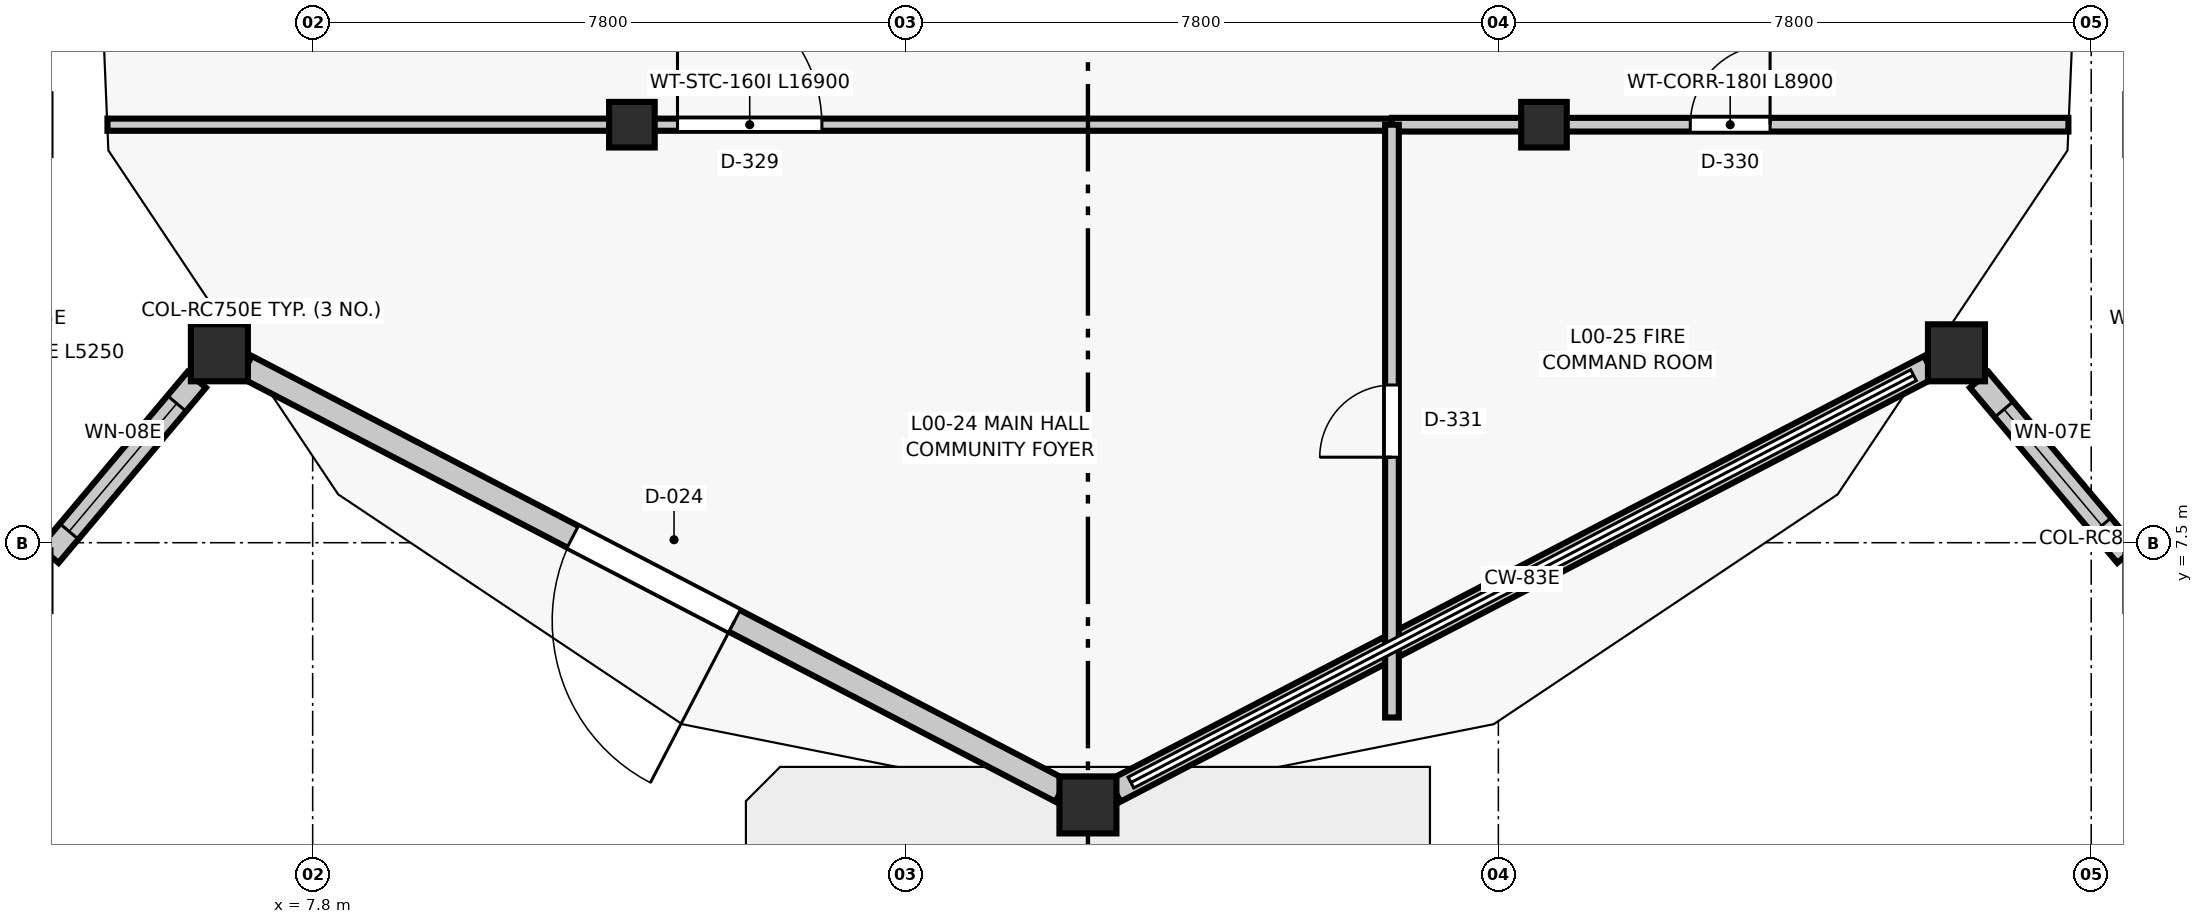
"""IFC4 building model, lengths in metres.
Left out: names, types, materials, properties, quantities, classifications, styles, units other than length and angle.
Written with IfcOpenShell. Run it as: python <this file> out.ifc"""

import sys

from ifc_helpers import new_model, si_unit, direction, frame, frame_2d, origin, origin_2d, place, context, subcontext, project, spatial, rectangle, extrude, element, fill, save


model = new_model("IFC4")
c1 = context("Model", 3, precision=1e-05, world=origin(), true_north=direction((0.0, 1.0)))
c2 = subcontext(c1, "Body", "Model", "MODEL_VIEW")
j1 = project(units=[si_unit("LENGTHUNIT", "METRE"), si_unit("PLANEANGLEUNIT", "RADIAN")], contexts=[c1])
p1 = place(None, origin())
s1 = spatial("IfcSite", under=j1, at=p1, CompositionType="ELEMENT")
p2 = place(p1, origin())
s2 = spatial("IfcBuilding", under=s1, at=p2, CompositionType="ELEMENT")
p3 = place(p2, origin())
s3 = spatial("IfcBuildingStorey", under=s2, at=p3, CompositionType="ELEMENT", Elevation=0.0)
for number, where, z_axis, x_axis in (
    (1, (6.573, 9.999, 0.0), (0.0, 0.0, 1.0), (1.0, 0.0, 0.0)),
    (2, (18.0, 4.05, 0.0), (0.0, 0.0, 1.0), (1.0, 0.0, 0.0)),
    (3, (29.427, 9.999, 0.0), (0.0, 0.0, 1.0), (1.0, 0.0, 0.0)),
):
    element("IfcColumn", number, at=place(p3, frame(where, z_axis=z_axis, x_axis=x_axis)), inside=s3, PredefinedType="COLUMN", context=c2, shape_type="SweptSolid", body=[
        extrude(rectangle(XDim=0.75, YDim=0.75, at=origin_2d()), origin(), (0.0, 0.0, 1.0), 4.5),
    ])
for number, where, z_axis, x_axis in (
    (4, (12.0, 13.0, 0.0), (0.0, 0.0, 1.0), (1.0, 0.0, 0.0)),
    (5, (24.0, 13.0, 0.0), (0.0, 0.0, 1.0), (1.0, 0.0, 0.0)),
):
    element("IfcColumn", number, at=place(p3, frame(where, z_axis=z_axis, x_axis=x_axis)), inside=s3, PredefinedType="COLUMN", context=c2, shape_type="SweptSolid", body=[
        extrude(rectangle(XDim=0.6, YDim=0.6, at=origin_2d()), origin(), (0.0, 0.0, 1.0), 4.5),
    ])
p4 = place(p3, frame((31.666, 7.337, 0.0), z_axis=(0.0, 0.0, 1.0), x_axis=(-0.643796278673, 0.765196936459, 0.0)))
e6 = element("IfcWall", 6, at=p4, inside=s3, PredefinedType="STANDARD", context=c2, shape_type="SweptSolid", body=[
    extrude(rectangle(XDim=3.012, YDim=0.32, at=frame_2d((1.506, 0.0))), origin(), (0.0, 0.0, 1.0), 3.71),
])
p5 = place(p4, frame((0.506, 0.0, 0.85)))
e7 = element("IfcOpeningElement", 7, at=p5, cuts=e6, PredefinedType="OPENING", context=c2, shape_type="SweptSolid", body=[
    extrude(rectangle(XDim=2.0, YDim=1.4, at=frame_2d((1.0, 0.7))), frame((0.0, 0.17, 0.0), z_axis=(0.0, -1.0, 0.0), x_axis=(1.0, 0.0, 0.0)), (0.0, 0.0, 1.0), 0.34),
])
p6 = place(p3, frame((29.074, 9.815, 0.0), z_axis=(0.0, 0.0, 1.0), x_axis=(-0.887012674584, -0.46174507591, 0.0)))
e8 = element("IfcWall", 8, at=p6, inside=s3, PredefinedType="STANDARD", context=c2, shape_type="SweptSolid", body=[
    extrude(rectangle(XDim=12.087, YDim=0.32, at=frame_2d((6.044, 0.0))), origin(), (0.0, 0.0, 1.0), 0.8),
])
p7 = place(p3, frame((17.647, 4.234, 0.0), z_axis=(0.0, 0.0, 1.0), x_axis=(-0.887012674584, 0.46174507591, 0.0)))
e9 = element("IfcWall", 9, at=p7, inside=s3, PredefinedType="STANDARD", context=c2, shape_type="SweptSolid", body=[
    extrude(rectangle(XDim=12.087, YDim=0.32, at=frame_2d((6.044, 0.0))), origin(), (0.0, 0.0, 1.0), 3.71),
])
p8 = place(p7, frame((4.844, 0.0, 0.0)))
e10 = element("IfcOpeningElement", 10, at=p8, cuts=e9, PredefinedType="OPENING", context=c2, shape_type="SweptSolid", body=[
    extrude(rectangle(XDim=2.4, YDim=2.35, at=frame_2d((1.2, 1.175))), frame((0.0, 0.17, 0.0), z_axis=(0.0, -1.0, 0.0), x_axis=(1.0, 0.0, 0.0)), (0.0, 0.0, 1.0), 0.34),
])
p9 = place(p3, frame((6.273, 9.643, 0.0), z_axis=(0.0, 0.0, 1.0), x_axis=(-0.643796278673, -0.765196936459, 0.0)))
e11 = element("IfcWall", 11, at=p9, inside=s3, PredefinedType="STANDARD", context=c2, shape_type="SweptSolid", body=[
    extrude(rectangle(XDim=3.012, YDim=0.32, at=frame_2d((1.506, 0.0))), origin(), (0.0, 0.0, 1.0), 3.71),
])
p10 = place(p9, frame((0.406, 0.0, 0.85)))
e12 = element("IfcOpeningElement", 12, at=p10, cuts=e11, PredefinedType="OPENING", context=c2, shape_type="SweptSolid", body=[
    extrude(rectangle(XDim=2.2, YDim=1.4, at=frame_2d((1.1, 0.7))), frame((0.0, 0.17, 0.0), z_axis=(0.0, -1.0, 0.0), x_axis=(1.0, 0.0, 0.0)), (0.0, 0.0, 1.0), 0.34),
])
p11 = place(p3, frame((5.1, 13.0, 0.0), z_axis=(0.0, 0.0, 1.0), x_axis=(1.0, 0.0, 0.0)))
e13 = element("IfcWall", 13, at=p11, inside=s3, PredefinedType="PARTITIONING", context=c2, shape_type="SweptSolid", body=[
    extrude(rectangle(XDim=16.9, YDim=0.16, at=frame_2d((8.45, 0.0))), origin(), (0.0, 0.0, 1.0), 3.445),
])
p12 = place(p11, frame((7.5, 0.0, 0.0)))
e14 = element("IfcOpeningElement", 14, at=p12, cuts=e13, PredefinedType="OPENING", context=c2, shape_type="SweptSolid", body=[
    extrude(rectangle(XDim=1.9, YDim=2.25, at=frame_2d((0.95, 1.125))), frame((0.0, 0.09, 0.0), z_axis=(0.0, -1.0, 0.0), x_axis=(1.0, 0.0, 0.0)), (0.0, 0.0, 1.0), 0.18),
])
p13 = place(p3, frame((22.0, 13.0, 0.0), z_axis=(0.0, 0.0, 1.0), x_axis=(1.0, 0.0, 0.0)))
e15 = element("IfcWall", 15, at=p13, inside=s3, PredefinedType="PARTITIONING", context=c2, shape_type="SweptSolid", body=[
    extrude(rectangle(XDim=8.9, YDim=0.18, at=frame_2d((4.45, 0.0))), origin(), (0.0, 0.0, 1.0), 3.445),
])
p14 = place(p13, frame((3.925, 0.0, 0.0)))
e16 = element("IfcOpeningElement", 16, at=p14, cuts=e15, PredefinedType="OPENING", context=c2, shape_type="SweptSolid", body=[
    extrude(rectangle(XDim=1.05, YDim=2.1, at=frame_2d((0.525, 1.05))), frame((0.0, 0.1, 0.0), z_axis=(0.0, -1.0, 0.0), x_axis=(1.0, 0.0, 0.0)), (0.0, 0.0, 1.0), 0.2),
])
p15 = place(p3, frame((22.0, 5.2, 0.0), z_axis=(0.0, 0.0, 1.0), x_axis=(0.0, 1.0, 0.0)))
e17 = element("IfcWall", 17, at=p15, inside=s3, PredefinedType="PARTITIONING", context=c2, shape_type="SweptSolid", body=[
    extrude(rectangle(XDim=7.8, YDim=0.18, at=frame_2d((3.9, 0.0))), origin(), (0.0, 0.0, 1.0), 4.255),
])
p16 = place(p15, frame((3.425, 0.0, 0.0)))
e18 = element("IfcOpeningElement", 18, at=p16, cuts=e17, PredefinedType="OPENING", context=c2, shape_type="SweptSolid", body=[
    extrude(rectangle(XDim=0.95, YDim=2.1, at=frame_2d((0.475, 1.05))), frame((0.0, 0.1, 0.0), z_axis=(0.0, -1.0, 0.0), x_axis=(1.0, 0.0, 0.0)), (0.0, 0.0, 1.0), 0.2),
])
p17 = place(p5, origin())
e19 = element("IfcWindow", 19, at=p17, inside=s3, PartitioningType="SINGLE_PANEL", PredefinedType="WINDOW", context=c2, shape_type="SweptSolid", body=[
    extrude(rectangle(XDim=2.0, YDim=1.4, at=frame_2d((1.0, 0.7))), frame((0.0, 0.03, 0.0), z_axis=(0.0, -1.0, 0.0), x_axis=(1.0, 0.0, 0.0)), (0.0, 0.0, 1.0), 0.06),
])
fill(e7, e19)
p18 = place(p8, origin())
e20 = element("IfcDoor", 20, at=p18, inside=s3, OperationType="SINGLE_SWING_LEFT", PredefinedType="DOOR", context=c2, shape_type="SweptSolid", body=[
    extrude(rectangle(XDim=2.4, YDim=2.35, at=frame_2d((1.2, 1.175))), frame((0.0, 0.025, 0.0), z_axis=(0.0, -1.0, 0.0), x_axis=(1.0, 0.0, 0.0)), (0.0, 0.0, 1.0), 0.05),
])
fill(e10, e20)
p19 = place(p10, origin())
e21 = element("IfcWindow", 21, at=p19, inside=s3, PartitioningType="SINGLE_PANEL", PredefinedType="WINDOW", context=c2, shape_type="SweptSolid", body=[
    extrude(rectangle(XDim=2.2, YDim=1.4, at=frame_2d((1.1, 0.7))), frame((0.0, 0.03, 0.0), z_axis=(0.0, -1.0, 0.0), x_axis=(1.0, 0.0, 0.0)), (0.0, 0.0, 1.0), 0.06),
])
fill(e12, e21)
p20 = place(p12, origin())
e22 = element("IfcDoor", 22, at=p20, inside=s3, OperationType="SINGLE_SWING_LEFT", PredefinedType="DOOR", context=c2, shape_type="SweptSolid", body=[
    extrude(rectangle(XDim=1.9, YDim=2.25, at=frame_2d((0.95, 1.125))), frame((0.0, 0.025, 0.0), z_axis=(0.0, -1.0, 0.0), x_axis=(1.0, 0.0, 0.0)), (0.0, 0.0, 1.0), 0.05),
])
fill(e14, e22)
p21 = place(p14, origin())
e23 = element("IfcDoor", 23, at=p21, inside=s3, OperationType="SINGLE_SWING_RIGHT", PredefinedType="DOOR", context=c2, shape_type="SweptSolid", body=[
    extrude(rectangle(XDim=1.05, YDim=2.1, at=frame_2d((0.525, 1.05))), frame((0.0, 0.025, 0.0), z_axis=(0.0, -1.0, 0.0), x_axis=(1.0, 0.0, 0.0)), (0.0, 0.0, 1.0), 0.05),
])
fill(e16, e23)
p22 = place(p16, origin())
e24 = element("IfcDoor", 24, at=p22, inside=s3, OperationType="SINGLE_SWING_LEFT", PredefinedType="DOOR", context=c2, shape_type="SweptSolid", body=[
    extrude(rectangle(XDim=0.95, YDim=2.1, at=frame_2d((0.475, 1.05))), frame((0.0, 0.025, 0.0), z_axis=(0.0, -1.0, 0.0), x_axis=(1.0, 0.0, 0.0)), (0.0, 0.0, 1.0), 0.05),
])
fill(e18, e24)
save(model, sys.argv[1])
